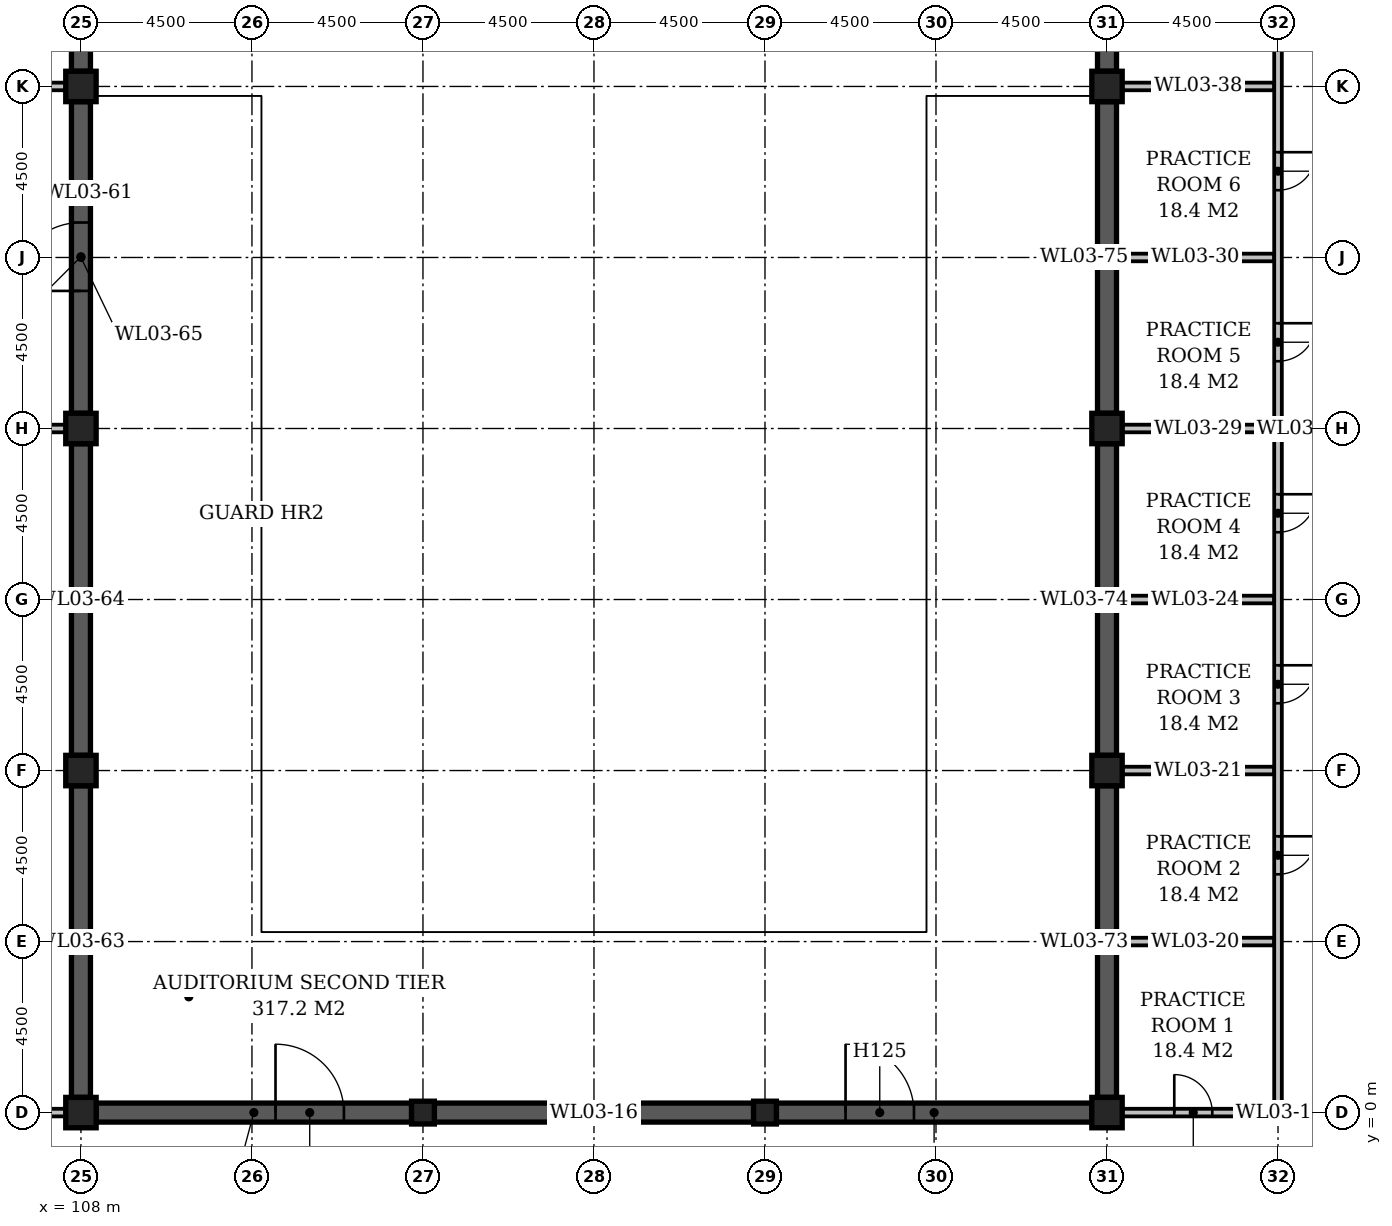
"""IFC4 building model, lengths in metres.
Left out: names, types, materials, properties, quantities, classifications, styles, units other than length and angle.
Written with IfcOpenShell. Run it as: python <this file> out.ifc"""

import sys

from ifc_helpers import new_model, si_unit, direction, frame, frame_2d, origin, origin_2d, place, context, subcontext, project, spatial, rectangle, extrude, element, fill, save


model = new_model("IFC4")
c1 = context("Model", 3, precision=1e-05, world=origin(), true_north=direction((0.0, 1.0)))
c2 = subcontext(c1, "Body", "Model", "MODEL_VIEW")
j1 = project(units=[si_unit("LENGTHUNIT", "METRE"), si_unit("PLANEANGLEUNIT", "RADIAN")], contexts=[c1])
p1 = place(None, origin())
s1 = spatial("IfcSite", under=j1, at=p1, CompositionType="ELEMENT")
p2 = place(p1, origin())
s2 = spatial("IfcBuilding", under=s1, at=p2, CompositionType="ELEMENT")
p3 = place(p2, frame((0.0, 0.0, 19.0)))
s3 = spatial("IfcBuildingStorey", under=s2, at=p3, CompositionType="ELEMENT", Elevation=19.0)
for number, where, z_axis, x_axis in (
    (1, (108.0, 0.0, -0.3), (0.0, 0.0, 1.0), (1.0, 0.0, 0.0)),
    (2, (108.0, 9.0, -0.3), (0.0, 0.0, 1.0), (1.0, 0.0, 0.0)),
    (3, (108.0, 18.0, -0.3), (0.0, 0.0, 1.0), (1.0, 0.0, 0.0)),
    (4, (108.0, 27.0, -0.3), (0.0, 0.0, 1.0), (1.0, 0.0, 0.0)),
):
    element("IfcColumn", number, at=place(p3, frame(where, z_axis=z_axis, x_axis=x_axis)), inside=s3, PredefinedType="COLUMN", context=c2, shape_type="SweptSolid", body=[
        extrude(rectangle(XDim=0.8, YDim=0.8, at=origin_2d()), origin(), (0.0, 0.0, 1.0), 5.0),
    ])
for number, where, z_axis, x_axis in (
    (5, (117.0, 0.0, -0.3), (0.0, 0.0, 1.0), (1.0, 0.0, 0.0)),
    (6, (126.0, 0.0, -0.3), (0.0, 0.0, 1.0), (1.0, 0.0, 0.0)),
):
    element("IfcColumn", number, at=place(p3, frame(where, z_axis=z_axis, x_axis=x_axis)), inside=s3, PredefinedType="COLUMN", context=c2, shape_type="SweptSolid", body=[
        extrude(rectangle(XDim=0.6, YDim=0.6, at=origin_2d()), origin(), (0.0, 0.0, 1.0), 5.0),
    ])
for number, where, z_axis, x_axis in (
    (7, (135.0, 0.0, -0.3), (0.0, 0.0, 1.0), (1.0, 0.0, 0.0)),
    (8, (135.0, 9.0, -0.3), (0.0, 0.0, 1.0), (1.0, 0.0, 0.0)),
    (9, (135.0, 18.0, -0.3), (0.0, 0.0, 1.0), (1.0, 0.0, 0.0)),
    (10, (135.0, 27.0, -0.3), (0.0, 0.0, 1.0), (1.0, 0.0, 0.0)),
):
    element("IfcColumn", number, at=place(p3, frame(where, z_axis=z_axis, x_axis=x_axis)), inside=s3, PredefinedType="COLUMN", context=c2, shape_type="SweptSolid", body=[
        extrude(rectangle(XDim=0.8, YDim=0.8, at=origin_2d()), origin(), (0.0, 0.0, 1.0), 5.0),
    ])
p4 = place(p3, frame((99.3, 0.0, 0.0), z_axis=(0.0, 0.0, 1.0), x_axis=(1.0, 0.0, 0.0)))
e11 = element("IfcWall", 11, at=p4, inside=s3, PredefinedType="STANDARD", context=c2, shape_type="SweptSolid", body=[
    extrude(rectangle(XDim=8.3, YDim=0.2, at=frame_2d((4.15, 0.0))), origin(), (0.0, 0.0, 1.0), 4.7),
])
p5 = place(p3, frame((108.4, 0.0, 0.0), z_axis=(0.0, 0.0, 1.0), x_axis=(1.0, 0.0, 0.0)))
e12 = element("IfcWall", 12, at=p5, inside=s3, PredefinedType="STANDARD", context=c2, shape_type="SweptSolid", body=[
    extrude(rectangle(XDim=8.3, YDim=0.5, at=frame_2d((4.15, 0.0))), origin(), (0.0, 0.0, 1.0), 5.0),
])
p6 = place(p5, frame((4.72, 0.0, 0.0)))
e13 = element("IfcOpeningElement", 13, at=p6, cuts=e12, PredefinedType="OPENING", context=c2, shape_type="SweptSolid", body=[
    extrude(rectangle(XDim=1.8, YDim=2.4, at=frame_2d((0.9, 1.2))), frame((0.0, 0.262, 0.0), z_axis=(0.0, -1.0, 0.0), x_axis=(1.0, 0.0, 0.0)), (0.0, 0.0, 1.0), 0.524),
])
p7 = place(p3, frame((117.3, 0.0, 0.0), z_axis=(0.0, 0.0, 1.0), x_axis=(1.0, 0.0, 0.0)))
e14 = element("IfcWall", 14, at=p7, inside=s3, PredefinedType="STANDARD", context=c2, shape_type="SweptSolid", body=[
    extrude(rectangle(XDim=8.4, YDim=0.5, at=frame_2d((4.2, 0.0))), origin(), (0.0, 0.0, 1.0), 5.0),
])
p8 = place(p3, frame((126.3, 0.0, 0.0), z_axis=(0.0, 0.0, 1.0), x_axis=(1.0, 0.0, 0.0)))
e15 = element("IfcWall", 15, at=p8, inside=s3, PredefinedType="STANDARD", context=c2, shape_type="SweptSolid", body=[
    extrude(rectangle(XDim=8.3, YDim=0.5, at=frame_2d((4.15, 0.0))), origin(), (0.0, 0.0, 1.0), 5.0),
])
p9 = place(p8, frame((1.82, 0.0, 0.0)))
e16 = element("IfcOpeningElement", 16, at=p9, cuts=e15, PredefinedType="OPENING", context=c2, shape_type="SweptSolid", body=[
    extrude(rectangle(XDim=1.8, YDim=2.4, at=frame_2d((0.9, 1.2))), frame((0.0, 0.262, 0.0), z_axis=(0.0, -1.0, 0.0), x_axis=(1.0, 0.0, 0.0)), (0.0, 0.0, 1.0), 0.524),
])
p10 = place(p3, frame((135.4, 0.0, 0.0), z_axis=(0.0, 0.0, 1.0), x_axis=(1.0, 0.0, 0.0)))
e17 = element("IfcWall", 17, at=p10, inside=s3, PredefinedType="STANDARD", context=c2, shape_type="SweptSolid", body=[
    extrude(rectangle(XDim=8.3, YDim=0.2, at=frame_2d((4.15, 0.0))), origin(), (0.0, 0.0, 1.0), 4.7),
])
p11 = place(p10, frame((5.77, 0.0, 0.0)))
e18 = element("IfcOpeningElement", 18, at=p11, cuts=e17, PredefinedType="OPENING", context=c2, shape_type="SweptSolid", body=[
    extrude(rectangle(XDim=1.2, YDim=2.1, at=frame_2d((0.6, 1.05))), frame((0.0, 0.112, 0.0), z_axis=(0.0, -1.0, 0.0), x_axis=(1.0, 0.0, 0.0)), (0.0, 0.0, 1.0), 0.224),
])
p12 = place(p10, frame((1.37, 0.0, 0.0)))
e19 = element("IfcOpeningElement", 19, at=p12, cuts=e17, PredefinedType="OPENING", context=c2, shape_type="SweptSolid", body=[
    extrude(rectangle(XDim=1.0, YDim=2.1, at=frame_2d((0.5, 1.05))), frame((0.0, 0.112, 0.0), z_axis=(0.0, -1.0, 0.0), x_axis=(1.0, 0.0, 0.0)), (0.0, 0.0, 1.0), 0.224),
])
p13 = place(p3, frame((135.25, 4.5, 0.0), z_axis=(0.0, 0.0, 1.0), x_axis=(1.0, 0.0, 0.0)))
e20 = element("IfcWall", 20, at=p13, inside=s3, PredefinedType="STANDARD", context=c2, shape_type="SweptSolid", body=[
    extrude(rectangle(XDim=4.15, YDim=0.2, at=frame_2d((2.075, 0.0))), origin(), (0.0, 0.0, 1.0), 4.7),
])
p14 = place(p3, frame((135.4, 9.0, 0.0), z_axis=(0.0, 0.0, 1.0), x_axis=(1.0, 0.0, 0.0)))
e21 = element("IfcWall", 21, at=p14, inside=s3, PredefinedType="STANDARD", context=c2, shape_type="SweptSolid", body=[
    extrude(rectangle(XDim=4.0, YDim=0.2, at=frame_2d((2.0, 0.0))), origin(), (0.0, 0.0, 1.0), 4.7),
])
p15 = place(p3, frame((135.25, 13.5, 0.0), z_axis=(0.0, 0.0, 1.0), x_axis=(1.0, 0.0, 0.0)))
e22 = element("IfcWall", 22, at=p15, inside=s3, PredefinedType="STANDARD", context=c2, shape_type="SweptSolid", body=[
    extrude(rectangle(XDim=4.15, YDim=0.2, at=frame_2d((2.075, 0.0))), origin(), (0.0, 0.0, 1.0), 4.7),
])
p16 = place(p3, frame((94.5, 18.0, 0.0), z_axis=(0.0, 0.0, 1.0), x_axis=(1.0, 0.0, 0.0)))
e23 = element("IfcWall", 23, at=p16, inside=s3, PredefinedType="STANDARD", context=c2, shape_type="SweptSolid", body=[
    extrude(rectangle(XDim=13.1, YDim=0.2, at=frame_2d((6.55, 0.0))), origin(), (0.0, 0.0, 1.0), 3.3),
])
p17 = place(p16, frame((6.17, 0.0, 0.0)))
e24 = element("IfcOpeningElement", 24, at=p17, cuts=e23, PredefinedType="OPENING", context=c2, shape_type="SweptSolid", body=[
    extrude(rectangle(XDim=1.2, YDim=2.1, at=frame_2d((0.6, 1.05))), frame((0.0, 0.112, 0.0), z_axis=(0.0, -1.0, 0.0), x_axis=(1.0, 0.0, 0.0)), (0.0, 0.0, 1.0), 0.224),
])
p18 = place(p3, frame((135.4, 18.0, 0.0), z_axis=(0.0, 0.0, 1.0), x_axis=(1.0, 0.0, 0.0)))
e25 = element("IfcWall", 25, at=p18, inside=s3, PredefinedType="STANDARD", context=c2, shape_type="SweptSolid", body=[
    extrude(rectangle(XDim=4.0, YDim=0.2, at=frame_2d((2.0, 0.0))), origin(), (0.0, 0.0, 1.0), 4.7),
])
p19 = place(p3, frame((135.25, 22.5, 0.0), z_axis=(0.0, 0.0, 1.0), x_axis=(1.0, 0.0, 0.0)))
e26 = element("IfcWall", 26, at=p19, inside=s3, PredefinedType="STANDARD", context=c2, shape_type="SweptSolid", body=[
    extrude(rectangle(XDim=4.15, YDim=0.2, at=frame_2d((2.075, 0.0))), origin(), (0.0, 0.0, 1.0), 4.7),
])
p20 = place(p3, frame((99.3, 27.0, 0.0), z_axis=(0.0, 0.0, 1.0), x_axis=(1.0, 0.0, 0.0)))
e27 = element("IfcWall", 27, at=p20, inside=s3, PredefinedType="STANDARD", context=c2, shape_type="SweptSolid", body=[
    extrude(rectangle(XDim=8.3, YDim=0.2, at=frame_2d((4.15, 0.0))), origin(), (0.0, 0.0, 1.0), 4.7),
])
p21 = place(p20, frame((1.47, 0.0, 0.0)))
e28 = element("IfcOpeningElement", 28, at=p21, cuts=e27, PredefinedType="OPENING", context=c2, shape_type="SweptSolid", body=[
    extrude(rectangle(XDim=1.0, YDim=2.1, at=frame_2d((0.5, 1.05))), frame((0.0, 0.112, 0.0), z_axis=(0.0, -1.0, 0.0), x_axis=(1.0, 0.0, 0.0)), (0.0, 0.0, 1.0), 0.224),
])
p22 = place(p3, frame((135.4, 27.0, 0.0), z_axis=(0.0, 0.0, 1.0), x_axis=(1.0, 0.0, 0.0)))
e29 = element("IfcWall", 29, at=p22, inside=s3, PredefinedType="STANDARD", context=c2, shape_type="SweptSolid", body=[
    extrude(rectangle(XDim=4.0, YDim=0.2, at=frame_2d((2.0, 0.0))), origin(), (0.0, 0.0, 1.0), 4.7),
])
for number, where, z_axis, x_axis in (
    (30, (108.0, 0.4, 0.0), (0.0, 0.0, 1.0), (0.0, 1.0, 0.0)),
    (31, (108.0, 9.4, 0.0), (0.0, 0.0, 1.0), (0.0, 1.0, 0.0)),
):
    element("IfcWall", number, at=place(p3, frame(where, z_axis=z_axis, x_axis=x_axis)), inside=s3, PredefinedType="STANDARD", context=c2, shape_type="SweptSolid", body=[
        extrude(rectangle(XDim=8.2, YDim=0.5, at=frame_2d((4.1, 0.0))), origin(), (0.0, 0.0, 1.0), 5.0),
    ])
p23 = place(p3, frame((108.0, 18.4, 0.0), z_axis=(0.0, 0.0, 1.0), x_axis=(0.0, 1.0, 0.0)))
e32 = element("IfcWall", 32, at=p23, inside=s3, PredefinedType="STANDARD", context=c2, shape_type="SweptSolid", body=[
    extrude(rectangle(XDim=8.2, YDim=0.5, at=frame_2d((4.1, 0.0))), origin(), (0.0, 0.0, 1.0), 5.0),
])
p24 = place(p23, frame((3.22, 0.0, 0.0)))
e33 = element("IfcOpeningElement", 33, at=p24, cuts=e32, PredefinedType="OPENING", context=c2, shape_type="SweptSolid", body=[
    extrude(rectangle(XDim=1.8, YDim=2.4, at=frame_2d((0.9, 1.2))), frame((0.0, 0.262, 0.0), z_axis=(0.0, -1.0, 0.0), x_axis=(1.0, 0.0, 0.0)), (0.0, 0.0, 1.0), 0.524),
])
p25 = place(p3, frame((108.0, 27.4, 0.0), z_axis=(0.0, 0.0, 1.0), x_axis=(0.0, 1.0, 0.0)))
e34 = element("IfcWall", 34, at=p25, inside=s3, PredefinedType="STANDARD", context=c2, shape_type="SweptSolid", body=[
    extrude(rectangle(XDim=8.3, YDim=0.5, at=frame_2d((4.15, 0.0))), origin(), (0.0, 0.0, 1.0), 5.0),
])
for number, where, z_axis, x_axis in (
    (35, (135.0, 0.4, 0.0), (0.0, 0.0, 1.0), (0.0, 1.0, 0.0)),
    (36, (135.0, 9.4, 0.0), (0.0, 0.0, 1.0), (0.0, 1.0, 0.0)),
    (37, (135.0, 18.4, 0.0), (0.0, 0.0, 1.0), (0.0, 1.0, 0.0)),
):
    element("IfcWall", number, at=place(p3, frame(where, z_axis=z_axis, x_axis=x_axis)), inside=s3, PredefinedType="STANDARD", context=c2, shape_type="SweptSolid", body=[
        extrude(rectangle(XDim=8.2, YDim=0.5, at=frame_2d((4.1, 0.0))), origin(), (0.0, 0.0, 1.0), 5.0),
    ])
p26 = place(p3, frame((135.0, 27.4, 0.0), z_axis=(0.0, 0.0, 1.0), x_axis=(0.0, 1.0, 0.0)))
e38 = element("IfcWall", 38, at=p26, inside=s3, PredefinedType="STANDARD", context=c2, shape_type="SweptSolid", body=[
    extrude(rectangle(XDim=8.3, YDim=0.5, at=frame_2d((4.15, 0.0))), origin(), (0.0, 0.0, 1.0), 5.0),
])
p27 = place(p3, frame((139.5, 0.1, 0.0), z_axis=(0.0, 0.0, 1.0), x_axis=(0.0, 1.0, 0.0)))
e39 = element("IfcWall", 39, at=p27, inside=s3, PredefinedType="STANDARD", context=c2, shape_type="SweptSolid", body=[
    extrude(rectangle(XDim=35.775, YDim=0.2, at=frame_2d((17.887, 0.0))), origin(), (0.0, 0.0, 1.0), 4.7),
])
p28 = place(p27, frame((6.17, 0.0, 0.0)))
e40 = element("IfcOpeningElement", 40, at=p28, cuts=e39, PredefinedType="OPENING", context=c2, shape_type="SweptSolid", body=[
    extrude(rectangle(XDim=1.0, YDim=2.1, at=frame_2d((0.5, 1.05))), frame((0.0, 0.112, 0.0), z_axis=(0.0, -1.0, 0.0), x_axis=(1.0, 0.0, 0.0)), (0.0, 0.0, 1.0), 0.224),
])
p29 = place(p27, frame((10.67, 0.0, 0.0)))
e41 = element("IfcOpeningElement", 41, at=p29, cuts=e39, PredefinedType="OPENING", context=c2, shape_type="SweptSolid", body=[
    extrude(rectangle(XDim=1.0, YDim=2.1, at=frame_2d((0.5, 1.05))), frame((0.0, 0.112, 0.0), z_axis=(0.0, -1.0, 0.0), x_axis=(1.0, 0.0, 0.0)), (0.0, 0.0, 1.0), 0.224),
])
p30 = place(p27, frame((15.17, 0.0, 0.0)))
e42 = element("IfcOpeningElement", 42, at=p30, cuts=e39, PredefinedType="OPENING", context=c2, shape_type="SweptSolid", body=[
    extrude(rectangle(XDim=1.0, YDim=2.1, at=frame_2d((0.5, 1.05))), frame((0.0, 0.112, 0.0), z_axis=(0.0, -1.0, 0.0), x_axis=(1.0, 0.0, 0.0)), (0.0, 0.0, 1.0), 0.224),
])
p31 = place(p27, frame((19.67, 0.0, 0.0)))
e43 = element("IfcOpeningElement", 43, at=p31, cuts=e39, PredefinedType="OPENING", context=c2, shape_type="SweptSolid", body=[
    extrude(rectangle(XDim=1.0, YDim=2.1, at=frame_2d((0.5, 1.05))), frame((0.0, 0.112, 0.0), z_axis=(0.0, -1.0, 0.0), x_axis=(1.0, 0.0, 0.0)), (0.0, 0.0, 1.0), 0.224),
])
p32 = place(p27, frame((24.17, 0.0, 0.0)))
e44 = element("IfcOpeningElement", 44, at=p32, cuts=e39, PredefinedType="OPENING", context=c2, shape_type="SweptSolid", body=[
    extrude(rectangle(XDim=1.0, YDim=2.1, at=frame_2d((0.5, 1.05))), frame((0.0, 0.112, 0.0), z_axis=(0.0, -1.0, 0.0), x_axis=(1.0, 0.0, 0.0)), (0.0, 0.0, 1.0), 0.224),
])
p33 = place(p27, frame((30.92, 0.0, 0.0)))
e45 = element("IfcOpeningElement", 45, at=p33, cuts=e39, PredefinedType="OPENING", context=c2, shape_type="SweptSolid", body=[
    extrude(rectangle(XDim=1.0, YDim=2.1, at=frame_2d((0.5, 1.05))), frame((0.0, 0.112, 0.0), z_axis=(0.0, -1.0, 0.0), x_axis=(1.0, 0.0, 0.0)), (0.0, 0.0, 1.0), 0.224),
])
p34 = place(p24, origin())
e46 = element("IfcDoor", 46, at=p34, inside=s3, OperationType="DOUBLE_DOOR_SINGLE_SWING", PredefinedType="DOOR", context=c2, shape_type="SweptSolid", body=[
    extrude(rectangle(XDim=1.8, YDim=2.4, at=frame_2d((0.9, 1.2))), frame((0.0, 0.025, 0.0), z_axis=(0.0, -1.0, 0.0), x_axis=(1.0, 0.0, 0.0)), (0.0, 0.0, 1.0), 0.05),
])
fill(e33, e46)
p35 = place(p6, origin())
e47 = element("IfcDoor", 47, at=p35, inside=s3, OperationType="DOUBLE_DOOR_SINGLE_SWING", PredefinedType="DOOR", context=c2, shape_type="SweptSolid", body=[
    extrude(rectangle(XDim=1.8, YDim=2.4, at=frame_2d((0.9, 1.2))), frame((0.0, 0.025, 0.0), z_axis=(0.0, -1.0, 0.0), x_axis=(1.0, 0.0, 0.0)), (0.0, 0.0, 1.0), 0.05),
])
fill(e13, e47)
p36 = place(p9, origin())
e48 = element("IfcDoor", 48, at=p36, inside=s3, OperationType="DOUBLE_DOOR_SINGLE_SWING", PredefinedType="DOOR", context=c2, shape_type="SweptSolid", body=[
    extrude(rectangle(XDim=1.8, YDim=2.4, at=frame_2d((0.9, 1.2))), frame((0.0, 0.025, 0.0), z_axis=(0.0, -1.0, 0.0), x_axis=(1.0, 0.0, 0.0)), (0.0, 0.0, 1.0), 0.05),
])
fill(e16, e48)
p37 = place(p12, origin())
e49 = element("IfcDoor", 49, at=p37, inside=s3, OperationType="SINGLE_SWING_LEFT", PredefinedType="DOOR", context=c2, shape_type="SweptSolid", body=[
    extrude(rectangle(XDim=1.0, YDim=2.1, at=frame_2d((0.5, 1.05))), frame((0.0, 0.025, 0.0), z_axis=(0.0, -1.0, 0.0), x_axis=(1.0, 0.0, 0.0)), (0.0, 0.0, 1.0), 0.05),
])
fill(e19, e49)
p38 = place(p28, origin())
e50 = element("IfcDoor", 50, at=p38, inside=s3, OperationType="SINGLE_SWING_RIGHT", PredefinedType="DOOR", context=c2, shape_type="SweptSolid", body=[
    extrude(rectangle(XDim=1.0, YDim=2.1, at=frame_2d((0.5, 1.05))), frame((0.0, 0.025, 0.0), z_axis=(0.0, -1.0, 0.0), x_axis=(1.0, 0.0, 0.0)), (0.0, 0.0, 1.0), 0.05),
])
fill(e40, e50)
p39 = place(p29, origin())
e51 = element("IfcDoor", 51, at=p39, inside=s3, OperationType="SINGLE_SWING_RIGHT", PredefinedType="DOOR", context=c2, shape_type="SweptSolid", body=[
    extrude(rectangle(XDim=1.0, YDim=2.1, at=frame_2d((0.5, 1.05))), frame((0.0, 0.025, 0.0), z_axis=(0.0, -1.0, 0.0), x_axis=(1.0, 0.0, 0.0)), (0.0, 0.0, 1.0), 0.05),
])
fill(e41, e51)
p40 = place(p30, origin())
e52 = element("IfcDoor", 52, at=p40, inside=s3, OperationType="SINGLE_SWING_RIGHT", PredefinedType="DOOR", context=c2, shape_type="SweptSolid", body=[
    extrude(rectangle(XDim=1.0, YDim=2.1, at=frame_2d((0.5, 1.05))), frame((0.0, 0.025, 0.0), z_axis=(0.0, -1.0, 0.0), x_axis=(1.0, 0.0, 0.0)), (0.0, 0.0, 1.0), 0.05),
])
fill(e42, e52)
p41 = place(p31, origin())
e53 = element("IfcDoor", 53, at=p41, inside=s3, OperationType="SINGLE_SWING_RIGHT", PredefinedType="DOOR", context=c2, shape_type="SweptSolid", body=[
    extrude(rectangle(XDim=1.0, YDim=2.1, at=frame_2d((0.5, 1.05))), frame((0.0, 0.025, 0.0), z_axis=(0.0, -1.0, 0.0), x_axis=(1.0, 0.0, 0.0)), (0.0, 0.0, 1.0), 0.05),
])
fill(e43, e53)
p42 = place(p32, origin())
e54 = element("IfcDoor", 54, at=p42, inside=s3, OperationType="SINGLE_SWING_RIGHT", PredefinedType="DOOR", context=c2, shape_type="SweptSolid", body=[
    extrude(rectangle(XDim=1.0, YDim=2.1, at=frame_2d((0.5, 1.05))), frame((0.0, 0.025, 0.0), z_axis=(0.0, -1.0, 0.0), x_axis=(1.0, 0.0, 0.0)), (0.0, 0.0, 1.0), 0.05),
])
fill(e44, e54)
save(model, sys.argv[1])
